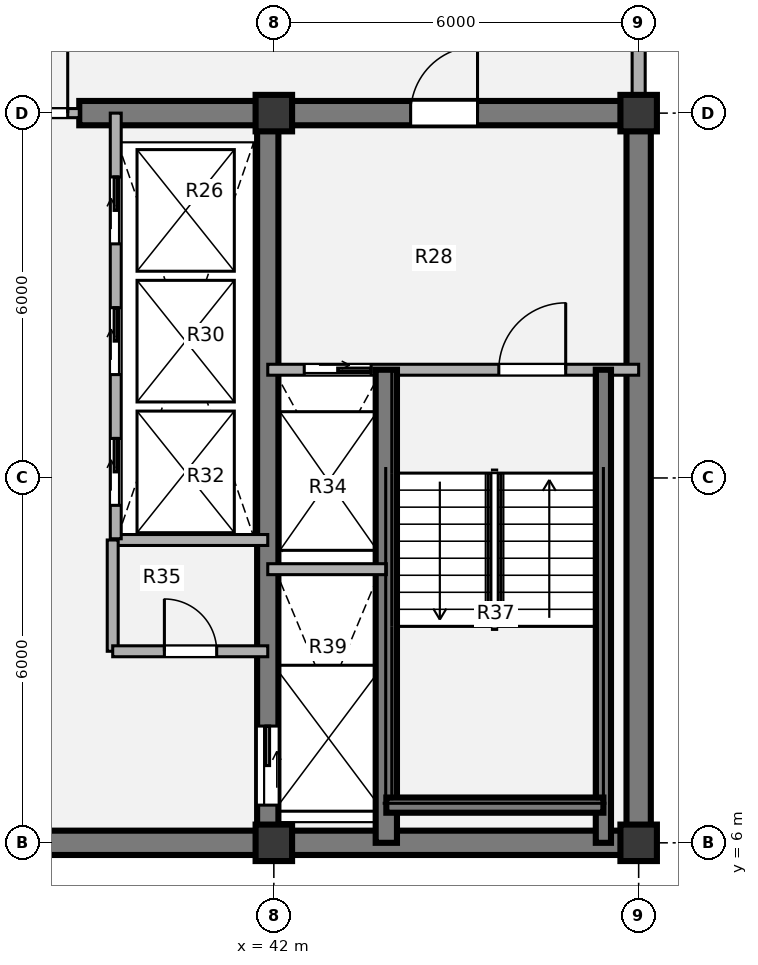
"""IFC4 building model, lengths in metres.
Left out: names, types, materials, properties, quantities, classifications, styles, units other than length and angle.
Written with IfcOpenShell. Run it as: python <this file> out.ifc"""

import sys

from ifc_helpers import new_model, si_unit, direction, frame, frame_2d, origin, origin_2d, place, context, subcontext, project, spatial, rectangle, extrude, source, transform, mapped, element, fill, save


model = new_model("IFC4")
c1 = context("Model", 3, precision=1e-05, world=origin(), true_north=direction((0.0, 1.0)))
c2 = subcontext(c1, "Body", "Model", "MODEL_VIEW")
j1 = project(units=[si_unit("LENGTHUNIT", "METRE"), si_unit("PLANEANGLEUNIT", "RADIAN")], contexts=[c1])
p1 = place(None, origin())
s1 = spatial("IfcSite", under=j1, at=p1, CompositionType="ELEMENT")
p2 = place(p1, origin())
s2 = spatial("IfcBuilding", under=s1, at=p2, CompositionType="ELEMENT")
p3 = place(p2, frame((0.0, 0.0, 264.6)))
s3 = spatial("IfcBuildingStorey", under=s2, at=p3, CompositionType="ELEMENT", Elevation=264.6)
m1 = source(origin(), c2, "Body", "SweptSolid", [
    extrude(rectangle(XDim=0.6, YDim=0.6, at=origin_2d()), origin(), (0.0, 0.0, 1.0), 3.78),
])
for number, where, z_axis, x_axis in (
    (1, (42.0, 6.0, 0.0), (0.0, 0.0, 1.0), (1.0, 0.0, 0.0)),
    (2, (48.0, 6.0, 0.0), (0.0, 0.0, 1.0), (1.0, 0.0, 0.0)),
    (3, (42.0, 18.0, 0.0), (0.0, 0.0, 1.0), (1.0, 0.0, 0.0)),
    (4, (48.0, 18.0, 0.0), (0.0, 0.0, 1.0), (1.0, 0.0, 0.0)),
):
    element("IfcColumn", number, at=place(p3, frame(where, z_axis=z_axis, x_axis=x_axis)), inside=s3, PredefinedType="COLUMN", context=c2, shape_type="MappedRepresentation", body=[
        mapped(m1, transform((0.0, 0.0, 0.0), x_axis=(1.0, 0.0, 0.0), y_axis=(0.0, 1.0, 0.0), z_axis=(0.0, 0.0, 1.0), scale=1.0)),
    ])
p4 = place(p3, frame((48.2, 6.0, 0.0), z_axis=(0.0, 0.0, 1.0), x_axis=(-1.0, 0.0, 0.0)))
e5 = element("IfcWall", 5, at=p4, inside=s3, PredefinedType="SHEAR", context=c2, shape_type="SweptSolid", body=[
    extrude(rectangle(XDim=24.4, YDim=0.4, at=frame_2d((12.2, 0.0))), origin(), (0.0, 0.0, 1.0), 3.78),
])
p5 = place(p3, frame((48.0, 18.0, 0.0), z_axis=(0.0, 0.0, 1.0), x_axis=(0.0, -1.0, 0.0)))
e6 = element("IfcWall", 6, at=p5, inside=s3, PredefinedType="SHEAR", context=c2, shape_type="SweptSolid", body=[
    extrude(rectangle(XDim=12.0, YDim=0.4, at=frame_2d((6.0, 0.0))), origin(), (0.0, 0.0, 1.0), 3.78),
])
p6 = place(p3, frame((38.8, 18.0, 0.0), z_axis=(0.0, 0.0, 1.0), x_axis=(1.0, 0.0, 0.0)))
e7 = element("IfcWall", 7, at=p6, inside=s3, PredefinedType="SHEAR", context=c2, shape_type="SweptSolid", body=[
    extrude(rectangle(XDim=9.4, YDim=0.4, at=frame_2d((4.7, 0.0))), origin(), (0.0, 0.0, 1.0), 3.78),
])
p7 = place(p6, frame((5.45, 0.0, 0.0)))
e8 = element("IfcOpeningElement", 8, at=p7, cuts=e7, PredefinedType="OPENING", context=c2, shape_type="SweptSolid", body=[
    extrude(rectangle(XDim=1.1, YDim=2.1, at=origin_2d()), frame((0.55, 0.21, 1.05), z_axis=(0.0, -1.0, 0.0), x_axis=(1.0, 0.0, 0.0)), (0.0, 0.0, 1.0), 0.42),
])
p8 = place(p3, frame((41.9, 18.0, 0.0), z_axis=(0.0, 0.0, 1.0), x_axis=(0.0, -1.0, 0.0)))
e9 = element("IfcWall", 9, at=p8, inside=s3, PredefinedType="SHEAR", context=c2, shape_type="SweptSolid", body=[
    extrude(rectangle(XDim=12.0, YDim=0.35, at=frame_2d((6.0, 0.0))), origin(), (0.0, 0.0, 1.0), 3.78),
])
p9 = place(p8, frame((10.08, 0.0, 0.0)))
e10 = element("IfcOpeningElement", 10, at=p9, cuts=e9, PredefinedType="OPENING", context=c2, shape_type="SweptSolid", body=[
    extrude(rectangle(XDim=1.3, YDim=2.1, at=origin_2d()), frame((0.65, 0.185, 1.05), z_axis=(0.0, -1.0, 0.0), x_axis=(1.0, 0.0, 0.0)), (0.0, 0.0, 1.0), 0.37),
])
p10 = place(p3, frame((48.0, 21.05, 0.0), z_axis=(0.0, 0.0, 1.0), x_axis=(0.0, -1.0, 0.0)))
e11 = element("IfcWall", 11, at=p10, inside=s3, PredefinedType="SOLIDWALL", context=c2, shape_type="SweptSolid", body=[
    extrude(rectangle(XDim=2.77, YDim=0.215, at=frame_2d((1.385, 0.0))), origin(), (0.0, 0.0, 1.0), 2.718),
])
p11 = place(p3, frame((39.35, 10.98, 0.0), z_axis=(0.0, 0.0, 1.0), x_axis=(1.0, 0.0, 0.0)))
e12 = element("IfcWall", 12, at=p11, inside=s3, PredefinedType="PARTITIONING", context=c2, shape_type="SweptSolid", body=[
    extrude(rectangle(XDim=2.55, YDim=0.18, at=frame_2d((1.275, 0.0))), origin(), (0.0, 0.0, 1.0), 3.5),
])
p12 = place(p3, frame((39.35, 9.15, 0.0), z_axis=(0.0, 0.0, 1.0), x_axis=(0.0, 1.0, 0.0)))
e13 = element("IfcWall", 13, at=p12, inside=s3, PredefinedType="PARTITIONING", context=c2, shape_type="SweptSolid", body=[
    extrude(rectangle(XDim=1.83, YDim=0.18, at=frame_2d((0.915, 0.0))), origin(), (0.0, 0.0, 1.0), 3.5),
])
p13 = place(p3, frame((39.35, 9.15, 0.0), z_axis=(0.0, 0.0, 1.0), x_axis=(1.0, 0.0, 0.0)))
e14 = element("IfcWall", 14, at=p13, inside=s3, PredefinedType="PARTITIONING", context=c2, shape_type="SweptSolid", body=[
    extrude(rectangle(XDim=2.55, YDim=0.18, at=frame_2d((1.275, 0.0))), origin(), (0.0, 0.0, 1.0), 3.5),
])
p14 = place(p13, frame((0.85, 0.0, 0.0)))
e15 = element("IfcOpeningElement", 15, at=p14, cuts=e14, PredefinedType="OPENING", context=c2, shape_type="SweptSolid", body=[
    extrude(rectangle(XDim=0.86, YDim=2.1, at=origin_2d()), frame((0.43, 0.1, 1.05), z_axis=(0.0, -1.0, 0.0), x_axis=(1.0, 0.0, 0.0)), (0.0, 0.0, 1.0), 0.2),
])
p15 = place(p3, frame((33.2, 18.0, 0.0), z_axis=(0.0, 0.0, 1.0), x_axis=(1.0, 0.0, 0.0)))
e16 = element("IfcWall", 16, at=p15, inside=s3, PredefinedType="PARTITIONING", context=c2, shape_type="SweptSolid", body=[
    extrude(rectangle(XDim=5.6, YDim=0.15, at=frame_2d((2.8, 0.0))), origin(), (0.0, 0.0, 1.0), 2.515),
])
p16 = place(p15, frame((0.19, 0.0, 0.0)))
e17 = element("IfcOpeningElement", 17, at=p16, cuts=e16, PredefinedType="OPENING", context=c2, shape_type="SweptSolid", body=[
    extrude(rectangle(XDim=1.1, YDim=2.1, at=origin_2d()), frame((0.55, 0.085, 1.05), z_axis=(0.0, -1.0, 0.0), x_axis=(1.0, 0.0, 0.0)), (0.0, 0.0, 1.0), 0.17),
])
p17 = place(p15, frame((4.31, 0.0, 0.0)))
e18 = element("IfcOpeningElement", 18, at=p17, cuts=e16, PredefinedType="OPENING", context=c2, shape_type="SweptSolid", body=[
    extrude(rectangle(XDim=1.1, YDim=2.1, at=origin_2d()), frame((0.55, 0.085, 1.05), z_axis=(0.0, -1.0, 0.0), x_axis=(1.0, 0.0, 0.0)), (0.0, 0.0, 1.0), 0.17),
])
p18 = place(p3, frame((41.9, 13.78, 0.0), z_axis=(0.0, 0.0, 1.0), x_axis=(1.0, 0.0, 0.0)))
e19 = element("IfcWall", 19, at=p18, inside=s3, PredefinedType="PARTITIONING", context=c2, shape_type="SweptSolid", body=[
    extrude(rectangle(XDim=6.1, YDim=0.18, at=frame_2d((3.05, 0.0))), origin(), (0.0, 0.0, 1.0), 3.5),
])
p19 = place(p18, frame((0.6, 0.0, 0.0)))
e20 = element("IfcOpeningElement", 20, at=p19, cuts=e19, PredefinedType="OPENING", context=c2, shape_type="SweptSolid", body=[
    extrude(rectangle(XDim=1.1, YDim=2.1, at=origin_2d()), frame((0.55, 0.1, 1.05), z_axis=(0.0, -1.0, 0.0), x_axis=(1.0, 0.0, 0.0)), (0.0, 0.0, 1.0), 0.2),
])
p20 = place(p18, frame((3.8, 0.0, 0.0)))
e21 = element("IfcOpeningElement", 21, at=p20, cuts=e19, PredefinedType="OPENING", context=c2, shape_type="SweptSolid", body=[
    extrude(rectangle(XDim=1.1, YDim=2.1, at=origin_2d()), frame((0.55, 0.1, 1.05), z_axis=(0.0, -1.0, 0.0), x_axis=(1.0, 0.0, 0.0)), (0.0, 0.0, 1.0), 0.2),
])
p21 = place(p3, frame((43.85, 6.0, 0.0), z_axis=(0.0, 0.0, 1.0), x_axis=(0.0, 1.0, 0.0)))
e22 = element("IfcWall", 22, at=p21, inside=s3, PredefinedType="SHEAR", context=c2, shape_type="SweptSolid", body=[
    extrude(rectangle(XDim=7.78, YDim=0.35, at=frame_2d((3.89, 0.0))), origin(), (0.0, 0.0, 1.0), 3.85),
])
p22 = place(p3, frame((47.42, 6.0, 0.0), z_axis=(0.0, 0.0, 1.0), x_axis=(0.0, 1.0, 0.0)))
e23 = element("IfcWall", 23, at=p22, inside=s3, PredefinedType="SHEAR", context=c2, shape_type="SweptSolid", body=[
    extrude(rectangle(XDim=7.78, YDim=0.25, at=frame_2d((3.89, 0.0))), origin(), (0.0, 0.0, 1.0), 3.85),
])
p23 = place(p3, frame((43.85, 6.62, 0.0), z_axis=(0.0, 0.0, 1.0), x_axis=(1.0, 0.0, 0.0)))
e24 = element("IfcWall", 24, at=p23, inside=s3, PredefinedType="SHEAR", context=c2, shape_type="SweptSolid", body=[
    extrude(rectangle(XDim=3.57, YDim=0.25, at=frame_2d((1.785, 0.0))), origin(), (0.0, 0.0, 1.0), 3.85),
])
p24 = place(p3, frame((41.9, 10.5, 0.0), z_axis=(0.0, 0.0, 1.0), x_axis=(1.0, 0.0, 0.0)))
e25 = element("IfcWall", 25, at=p24, inside=s3, PredefinedType="PARTITIONING", context=c2, shape_type="SweptSolid", body=[
    extrude(rectangle(XDim=1.95, YDim=0.18, at=frame_2d((0.975, 0.0))), origin(), (0.0, 0.0, 1.0), 3.5),
])
p25 = place(p3, frame((39.4, 11.0, 0.0), z_axis=(0.0, 0.0, 1.0), x_axis=(0.0, 1.0, 0.0)))
e26 = element("IfcWall", 26, at=p25, inside=s3, PredefinedType="PARTITIONING", context=c2, shape_type="SweptSolid", body=[
    extrude(rectangle(XDim=7.0, YDim=0.18, at=frame_2d((3.5, 0.0))), origin(), (0.0, 0.0, 1.0), 3.5),
])
p26 = place(p25, frame((0.55, 0.0, 0.0)))
e27 = element("IfcOpeningElement", 27, at=p26, cuts=e26, PredefinedType="OPENING", context=c2, shape_type="SweptSolid", body=[
    extrude(rectangle(XDim=1.1, YDim=2.1, at=origin_2d()), frame((0.55, 0.1, 1.05), z_axis=(0.0, -1.0, 0.0), x_axis=(1.0, 0.0, 0.0)), (0.0, 0.0, 1.0), 0.2),
])
p27 = place(p25, frame((2.7, 0.0, 0.0)))
e28 = element("IfcOpeningElement", 28, at=p27, cuts=e26, PredefinedType="OPENING", context=c2, shape_type="SweptSolid", body=[
    extrude(rectangle(XDim=1.1, YDim=2.1, at=origin_2d()), frame((0.55, 0.1, 1.05), z_axis=(0.0, -1.0, 0.0), x_axis=(1.0, 0.0, 0.0)), (0.0, 0.0, 1.0), 0.2),
])
p28 = place(p25, frame((4.85, 0.0, 0.0)))
e29 = element("IfcOpeningElement", 29, at=p28, cuts=e26, PredefinedType="OPENING", context=c2, shape_type="SweptSolid", body=[
    extrude(rectangle(XDim=1.1, YDim=2.1, at=origin_2d()), frame((0.55, 0.1, 1.05), z_axis=(0.0, -1.0, 0.0), x_axis=(1.0, 0.0, 0.0)), (0.0, 0.0, 1.0), 0.2),
])
m2 = source(origin(), c2, "Body", "SweptSolid", [
    extrude(rectangle(XDim=0.86, YDim=2.1, at=origin_2d()), frame((0.43, 0.025, 1.05), z_axis=(0.0, -1.0, 0.0), x_axis=(1.0, 0.0, 0.0)), (0.0, 0.0, 1.0), 0.05),
])
p29 = place(p14, origin())
e30 = element("IfcDoor", 30, at=p29, inside=s3, OperationType="SINGLE_SWING_LEFT", PredefinedType="DOOR", context=c2, shape_type="MappedRepresentation", body=[
    mapped(m2, transform((0.0, 0.0, 0.0), x_axis=(1.0, 0.0, 0.0), y_axis=(0.0, 1.0, 0.0), z_axis=(0.0, 0.0, 1.0), scale=1.0)),
])
fill(e15, e30)
m3 = source(origin(), c2, "Body", "SweptSolid", [
    extrude(rectangle(XDim=1.1, YDim=2.1, at=origin_2d()), frame((0.55, 0.025, 1.05), z_axis=(0.0, -1.0, 0.0), x_axis=(1.0, 0.0, 0.0)), (0.0, 0.0, 1.0), 0.05),
])
p30 = place(p17, origin())
e31 = element("IfcDoor", 31, at=p30, inside=s3, OperationType="SINGLE_SWING_RIGHT", PredefinedType="DOOR", context=c2, shape_type="MappedRepresentation", body=[
    mapped(m3, transform((0.0, 0.0, 0.0), x_axis=(1.0, 0.0, 0.0), y_axis=(0.0, 1.0, 0.0), z_axis=(0.0, 0.0, 1.0), scale=1.0)),
])
fill(e18, e31)
m4 = source(origin(), c2, "Body", "SweptSolid", [
    extrude(rectangle(XDim=1.1, YDim=2.1, at=origin_2d()), frame((0.55, 0.025, 1.05), z_axis=(0.0, -1.0, 0.0), x_axis=(1.0, 0.0, 0.0)), (0.0, 0.0, 1.0), 0.05),
])
p31 = place(p19, origin())
e32 = element("IfcDoor", 32, at=p31, inside=s3, OperationType="SLIDING_TO_RIGHT", PredefinedType="DOOR", context=c2, shape_type="MappedRepresentation", body=[
    mapped(m4, transform((0.0, 0.0, 0.0), x_axis=(1.0, 0.0, 0.0), y_axis=(0.0, 1.0, 0.0), z_axis=(0.0, 0.0, 1.0), scale=1.0)),
])
fill(e20, e32)
m5 = source(origin(), c2, "Body", "SweptSolid", [
    extrude(rectangle(XDim=1.1, YDim=2.1, at=origin_2d()), frame((0.55, 0.025, 1.05), z_axis=(0.0, -1.0, 0.0), x_axis=(1.0, 0.0, 0.0)), (0.0, 0.0, 1.0), 0.05),
])
p32 = place(p20, origin())
e33 = element("IfcDoor", 33, at=p32, inside=s3, OperationType="SINGLE_SWING_RIGHT", PredefinedType="DOOR", context=c2, shape_type="MappedRepresentation", body=[
    mapped(m5, transform((0.0, 0.0, 0.0), x_axis=(1.0, 0.0, 0.0), y_axis=(0.0, 1.0, 0.0), z_axis=(0.0, 0.0, 1.0), scale=1.0)),
])
fill(e21, e33)
m6 = source(origin(), c2, "Body", "SweptSolid", [
    extrude(rectangle(XDim=1.3, YDim=2.1, at=origin_2d()), frame((0.65, 0.025, 1.05), z_axis=(0.0, -1.0, 0.0), x_axis=(1.0, 0.0, 0.0)), (0.0, 0.0, 1.0), 0.05),
])
p33 = place(p9, origin())
e34 = element("IfcDoor", 34, at=p33, inside=s3, OperationType="SLIDING_TO_LEFT", PredefinedType="DOOR", context=c2, shape_type="MappedRepresentation", body=[
    mapped(m6, transform((0.0, 0.0, 0.0), x_axis=(1.0, 0.0, 0.0), y_axis=(0.0, 1.0, 0.0), z_axis=(0.0, 0.0, 1.0), scale=1.0)),
])
fill(e10, e34)
p34 = place(p7, origin())
e35 = element("IfcDoor", 35, at=p34, inside=s3, OperationType="SINGLE_SWING_RIGHT", PredefinedType="DOOR", context=c2, shape_type="MappedRepresentation", body=[
    mapped(m3, transform((0.0, 0.0, 0.0), x_axis=(1.0, 0.0, 0.0), y_axis=(0.0, 1.0, 0.0), z_axis=(0.0, 0.0, 1.0), scale=1.0)),
])
fill(e8, e35)
p35 = place(p26, origin())
e36 = element("IfcDoor", 36, at=p35, inside=s3, OperationType="SLIDING_TO_RIGHT", PredefinedType="DOOR", context=c2, shape_type="MappedRepresentation", body=[
    mapped(m4, transform((0.0, 0.0, 0.0), x_axis=(1.0, 0.0, 0.0), y_axis=(0.0, 1.0, 0.0), z_axis=(0.0, 0.0, 1.0), scale=1.0)),
])
fill(e27, e36)
p36 = place(p27, origin())
e37 = element("IfcDoor", 37, at=p36, inside=s3, OperationType="SLIDING_TO_RIGHT", PredefinedType="DOOR", context=c2, shape_type="MappedRepresentation", body=[
    mapped(m4, transform((0.0, 0.0, 0.0), x_axis=(1.0, 0.0, 0.0), y_axis=(0.0, 1.0, 0.0), z_axis=(0.0, 0.0, 1.0), scale=1.0)),
])
fill(e28, e37)
p37 = place(p28, origin())
e38 = element("IfcDoor", 38, at=p37, inside=s3, OperationType="SLIDING_TO_RIGHT", PredefinedType="DOOR", context=c2, shape_type="MappedRepresentation", body=[
    mapped(m4, transform((0.0, 0.0, 0.0), x_axis=(1.0, 0.0, 0.0), y_axis=(0.0, 1.0, 0.0), z_axis=(0.0, 0.0, 1.0), scale=1.0)),
])
fill(e29, e38)
save(model, sys.argv[1])
